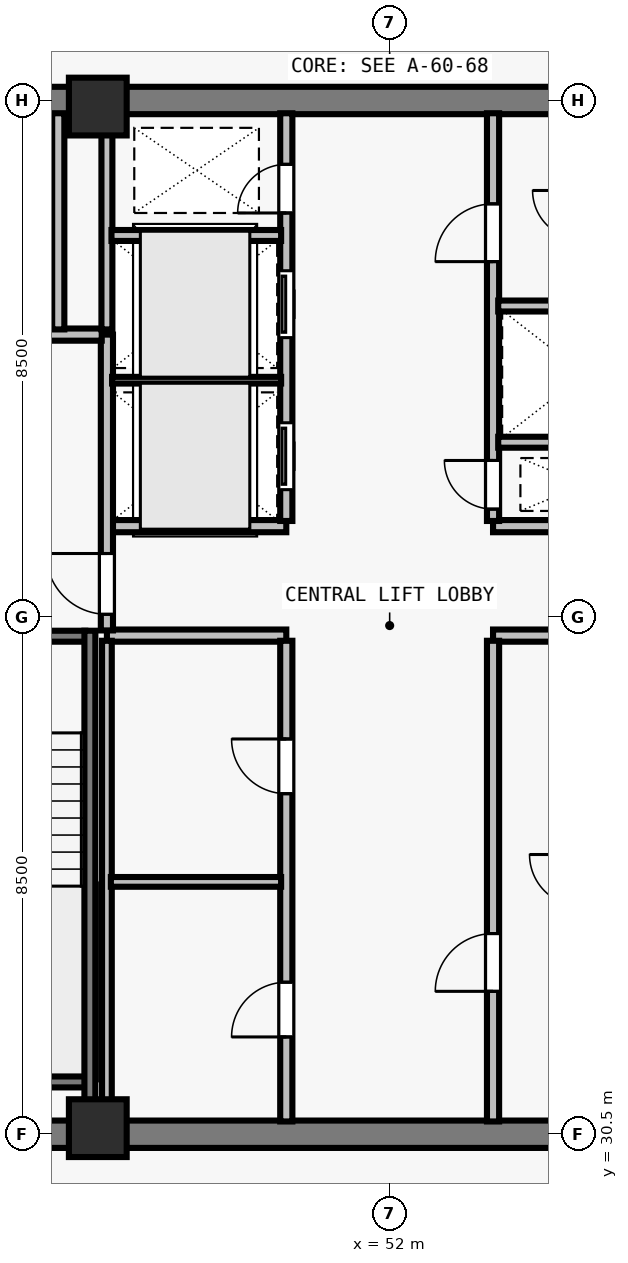
"""IFC4 building model, lengths in metres.
Left out: names, types, materials, properties, quantities, classifications, styles, units other than length and angle.
Written with IfcOpenShell. Run it as: python <this file> out.ifc"""

import sys

from ifc_helpers import new_model, si_unit, direction, frame, frame_2d, origin, origin_2d, place, context, subcontext, project, spatial, rectangle, extrude, element, fill, save


model = new_model("IFC4")
c1 = context("Model", 3, precision=1e-05, world=origin(), true_north=direction((0.0, 1.0)))
c2 = subcontext(c1, "Body", "Model", "MODEL_VIEW")
j1 = project(units=[si_unit("LENGTHUNIT", "METRE"), si_unit("PLANEANGLEUNIT", "RADIAN")], contexts=[c1])
p1 = place(None, origin())
s1 = spatial("IfcSite", under=j1, at=p1, CompositionType="ELEMENT")
p2 = place(p1, origin())
s2 = spatial("IfcBuilding", under=s1, at=p2, CompositionType="ELEMENT")
p3 = place(p2, frame((0.0, 0.0, 237.5)))
s3 = spatial("IfcBuildingStorey", under=s2, at=p3, CompositionType="ELEMENT", Elevation=237.5)
for number, where, z_axis, x_axis in (
    (1, (47.2, 30.6, 0.0), (0.0, 0.0, 1.0), (1.0, 0.0, 0.0)),
    (2, (47.2, 47.4, 0.0), (0.0, 0.0, 1.0), (1.0, 0.0, 0.0)),
):
    element("IfcColumn", number, at=place(p3, frame(where, z_axis=z_axis, x_axis=x_axis)), inside=s3, PredefinedType="COLUMN", context=c2, shape_type="SweptSolid", body=[
        extrude(rectangle(XDim=0.95, YDim=0.95, at=origin_2d()), origin(), (0.0, 0.0, 1.0), 3.5),
    ])
for number, where, z_axis, x_axis in (
    (3, (43.275, 30.5, 0.0), (0.0, 0.0, 1.0), (1.0, 0.0, 0.0)),
    (4, (43.275, 47.5, 0.0), (0.0, 0.0, 1.0), (1.0, 0.0, 0.0)),
):
    element("IfcWall", number, at=place(p3, frame(where, z_axis=z_axis, x_axis=x_axis)), inside=s3, PredefinedType="SHEAR", context=c2, shape_type="SweptSolid", body=[
        extrude(rectangle(XDim=17.45, YDim=0.45, at=frame_2d((8.725, 0.0))), origin(), (0.0, 0.0, 1.0), 3.29),
    ])
for number, where, z_axis, x_axis in (
    (5, (47.35, 38.7, 0.0), (0.0, 0.0, 1.0), (1.0, 0.0, 0.0)),
    (6, (47.35, 40.5, 0.0), (0.0, 0.0, 1.0), (1.0, 0.0, 0.0)),
    (7, (53.7, 38.7, 0.0), (0.0, 0.0, 1.0), (1.0, 0.0, 0.0)),
    (8, (53.7, 40.5, 0.0), (0.0, 0.0, 1.0), (1.0, 0.0, 0.0)),
):
    element("IfcWall", number, at=place(p3, frame(where, z_axis=z_axis, x_axis=x_axis)), inside=s3, PredefinedType="SOLIDWALL", context=c2, shape_type="SweptSolid", body=[
        extrude(rectangle(XDim=2.95, YDim=0.2, at=frame_2d((1.475, 0.0))), origin(), (0.0, 0.0, 1.0), 3.29),
    ])
p4 = place(p3, frame((50.3, 30.71, 0.0), z_axis=(0.0, 0.0, 1.0), x_axis=(0.0, 1.0, 0.0)))
e9 = element("IfcWall", 9, at=p4, inside=s3, PredefinedType="SOLIDWALL", context=c2, shape_type="SweptSolid", body=[
    extrude(rectangle(XDim=7.905, YDim=0.2, at=frame_2d((3.953, 0.0))), origin(), (0.0, 0.0, 1.0), 3.29),
])
p5 = place(p4, frame((1.39, 0.0, 0.0)))
e10 = element("IfcOpeningElement", 10, at=p5, cuts=e9, PredefinedType="OPENING", context=c2, shape_type="SweptSolid", body=[
    extrude(rectangle(XDim=0.9, YDim=2.12, at=frame_2d((0.45, 1.06))), frame((0.0, 0.11, 0.0), z_axis=(0.0, -1.0, 0.0), x_axis=(1.0, 0.0, 0.0)), (0.0, 0.0, 1.0), 0.22),
])
p6 = place(p4, frame((5.39, 0.0, 0.0)))
e11 = element("IfcOpeningElement", 11, at=p6, cuts=e9, PredefinedType="OPENING", context=c2, shape_type="SweptSolid", body=[
    extrude(rectangle(XDim=0.9, YDim=2.12, at=frame_2d((0.45, 1.06))), frame((0.0, 0.11, 0.0), z_axis=(0.0, -1.0, 0.0), x_axis=(1.0, 0.0, 0.0)), (0.0, 0.0, 1.0), 0.22),
])
p7 = place(p3, frame((53.7, 30.71, 0.0), z_axis=(0.0, 0.0, 1.0), x_axis=(0.0, 1.0, 0.0)))
e12 = element("IfcWall", 12, at=p7, inside=s3, PredefinedType="SOLIDWALL", context=c2, shape_type="SweptSolid", body=[
    extrude(rectangle(XDim=7.905, YDim=0.2, at=frame_2d((3.953, 0.0))), origin(), (0.0, 0.0, 1.0), 3.29),
])
p8 = place(p7, frame((2.14, 0.0, 0.0)))
e13 = element("IfcOpeningElement", 13, at=p8, cuts=e12, PredefinedType="OPENING", context=c2, shape_type="SweptSolid", body=[
    extrude(rectangle(XDim=0.95, YDim=2.12, at=frame_2d((0.475, 1.06))), frame((0.0, 0.11, 0.0), z_axis=(0.0, -1.0, 0.0), x_axis=(1.0, 0.0, 0.0)), (0.0, 0.0, 1.0), 0.22),
])
p9 = place(p3, frame((50.3, 40.585, 0.0), z_axis=(0.0, 0.0, 1.0), x_axis=(0.0, 1.0, 0.0)))
e14 = element("IfcWall", 14, at=p9, inside=s3, PredefinedType="SOLIDWALL", context=c2, shape_type="SweptSolid", body=[
    extrude(rectangle(XDim=6.705, YDim=0.2, at=frame_2d((3.353, 0.0))), origin(), (0.0, 0.0, 1.0), 3.29),
])
p10 = place(p9, frame((0.515, 0.0, 0.0)))
e15 = element("IfcOpeningElement", 15, at=p10, cuts=e14, PredefinedType="OPENING", context=c2, shape_type="SweptSolid", body=[
    extrude(rectangle(XDim=1.1, YDim=2.2, at=frame_2d((0.55, 1.1))), frame((0.0, 0.11, 0.0), z_axis=(0.0, -1.0, 0.0), x_axis=(1.0, 0.0, 0.0)), (0.0, 0.0, 1.0), 0.22),
])
p11 = place(p9, frame((3.015, 0.0, 0.0)))
e16 = element("IfcOpeningElement", 16, at=p11, cuts=e14, PredefinedType="OPENING", context=c2, shape_type="SweptSolid", body=[
    extrude(rectangle(XDim=1.1, YDim=2.2, at=frame_2d((0.55, 1.1))), frame((0.0, 0.11, 0.0), z_axis=(0.0, -1.0, 0.0), x_axis=(1.0, 0.0, 0.0)), (0.0, 0.0, 1.0), 0.22),
])
p12 = place(p9, frame((5.065, 0.0, 0.0)))
e17 = element("IfcOpeningElement", 17, at=p12, cuts=e14, PredefinedType="OPENING", context=c2, shape_type="SweptSolid", body=[
    extrude(rectangle(XDim=0.8, YDim=2.08, at=frame_2d((0.4, 1.04))), frame((0.0, 0.11, 0.0), z_axis=(0.0, -1.0, 0.0), x_axis=(1.0, 0.0, 0.0)), (0.0, 0.0, 1.0), 0.22),
])
p13 = place(p3, frame((53.7, 40.585, 0.0), z_axis=(0.0, 0.0, 1.0), x_axis=(0.0, 1.0, 0.0)))
e18 = element("IfcWall", 18, at=p13, inside=s3, PredefinedType="SOLIDWALL", context=c2, shape_type="SweptSolid", body=[
    extrude(rectangle(XDim=6.705, YDim=0.2, at=frame_2d((3.353, 0.0))), origin(), (0.0, 0.0, 1.0), 3.29),
])
p14 = place(p13, frame((0.195, 0.0, 0.0)))
e19 = element("IfcOpeningElement", 19, at=p14, cuts=e18, PredefinedType="OPENING", context=c2, shape_type="SweptSolid", body=[
    extrude(rectangle(XDim=0.8, YDim=2.08, at=frame_2d((0.4, 1.04))), frame((0.0, 0.11, 0.0), z_axis=(0.0, -1.0, 0.0), x_axis=(1.0, 0.0, 0.0)), (0.0, 0.0, 1.0), 0.22),
])
p15 = place(p13, frame((4.265, 0.0, 0.0)))
e20 = element("IfcOpeningElement", 20, at=p15, cuts=e18, PredefinedType="OPENING", context=c2, shape_type="SweptSolid", body=[
    extrude(rectangle(XDim=0.95, YDim=2.12, at=frame_2d((0.475, 1.06))), frame((0.0, 0.11, 0.0), z_axis=(0.0, -1.0, 0.0), x_axis=(1.0, 0.0, 0.0)), (0.0, 0.0, 1.0), 0.22),
])
p16 = place(p3, frame((47.35, 38.785, 0.0), z_axis=(0.0, 0.0, 1.0), x_axis=(0.0, 1.0, 0.0)))
e21 = element("IfcWall", 21, at=p16, inside=s3, PredefinedType="SOLIDWALL", context=c2, shape_type="SweptSolid", body=[
    extrude(rectangle(XDim=4.865, YDim=0.2, at=frame_2d((2.433, 0.0))), origin(), (0.0, 0.0, 1.0), 3.29),
])
p17 = place(p16, frame((0.265, 0.0, 0.0)))
e22 = element("IfcOpeningElement", 22, at=p17, cuts=e21, PredefinedType="OPENING", context=c2, shape_type="SweptSolid", body=[
    extrude(rectangle(XDim=1.0, YDim=2.15, at=frame_2d((0.5, 1.075))), frame((0.0, 0.11, 0.0), z_axis=(0.0, -1.0, 0.0), x_axis=(1.0, 0.0, 0.0)), (0.0, 0.0, 1.0), 0.22),
])
p18 = place(p3, frame((43.71, 43.65, 0.0), z_axis=(0.0, 0.0, 1.0), x_axis=(1.0, 0.0, 0.0)))
e23 = element("IfcWall", 23, at=p18, inside=s3, PredefinedType="SOLIDWALL", context=c2, shape_type="SweptSolid", body=[
    extrude(rectangle(XDim=3.555, YDim=0.2, at=frame_2d((1.777, 0.0))), origin(), (0.0, 0.0, 1.0), 3.29),
])
p19 = place(p18, frame((1.16, 0.0, 0.0)))
e24 = element("IfcOpeningElement", 24, at=p19, cuts=e23, PredefinedType="OPENING", context=c2, shape_type="SweptSolid", body=[
    extrude(rectangle(XDim=1.1, YDim=2.2, at=frame_2d((0.55, 1.1))), frame((0.0, 0.11, 0.0), z_axis=(0.0, -1.0, 0.0), x_axis=(1.0, 0.0, 0.0)), (0.0, 0.0, 1.0), 0.22),
])
p20 = place(p3, frame((46.55, 43.735, 0.0), z_axis=(0.0, 0.0, 1.0), x_axis=(0.0, 1.0, 0.0)))
e25 = element("IfcWall", 25, at=p20, inside=s3, PredefinedType="SOLIDWALL", context=c2, shape_type="SweptSolid", body=[
    extrude(rectangle(XDim=3.555, YDim=0.2, at=frame_2d((1.777, 0.0))), origin(), (0.0, 0.0, 1.0), 3.29),
])
p21 = place(p3, frame((47.35, 30.71, 0.0), z_axis=(0.0, 0.0, 1.0), x_axis=(0.0, 1.0, 0.0)))
e26 = element("IfcWall", 26, at=p21, inside=s3, PredefinedType="PARTITIONING", context=c2, shape_type="SweptSolid", body=[
    extrude(rectangle(XDim=7.905, YDim=0.16, at=frame_2d((3.953, 0.0))), origin(), (0.0, 0.0, 1.0), 3.29),
])
p22 = place(p3, frame((47.415, 34.65, 0.0), z_axis=(0.0, 0.0, 1.0), x_axis=(1.0, 0.0, 0.0)))
e27 = element("IfcWall", 27, at=p22, inside=s3, PredefinedType="PARTITIONING", context=c2, shape_type="SweptSolid", body=[
    extrude(rectangle(XDim=2.8, YDim=0.16, at=frame_2d((1.4, 0.0))), origin(), (0.0, 0.0, 1.0), 3.29),
])
p23 = place(p3, frame((47.35, 43.735, 0.0), z_axis=(0.0, 0.0, 1.0), x_axis=(0.0, 1.0, 0.0)))
e28 = element("IfcWall", 28, at=p23, inside=s3, PredefinedType="SOLIDWALL", context=c2, shape_type="SweptSolid", body=[
    extrude(rectangle(XDim=3.555, YDim=0.18, at=frame_2d((1.777, 0.0))), origin(), (0.0, 0.0, 1.0), 3.29),
])
p24 = place(p3, frame((47.435, 42.9, 0.0), z_axis=(0.0, 0.0, 1.0), x_axis=(1.0, 0.0, 0.0)))
e29 = element("IfcWall", 29, at=p24, inside=s3, PredefinedType="PARTITIONING", context=c2, shape_type="SweptSolid", body=[
    extrude(rectangle(XDim=2.78, YDim=0.11, at=frame_2d((1.39, 0.0))), origin(), (0.0, 0.0, 1.0), 3.29),
])
p25 = place(p3, frame((47.425, 45.28, 0.0), z_axis=(0.0, 0.0, 1.0), x_axis=(1.0, 0.0, 0.0)))
e30 = element("IfcWall", 30, at=p25, inside=s3, PredefinedType="SOLIDWALL", context=c2, shape_type="SweptSolid", body=[
    extrude(rectangle(XDim=2.79, YDim=0.18, at=frame_2d((1.395, 0.0))), origin(), (0.0, 0.0, 1.0), 3.29),
])
p26 = place(p3, frame((53.785, 41.88, 0.0), z_axis=(0.0, 0.0, 1.0), x_axis=(1.0, 0.0, 0.0)))
e31 = element("IfcWall", 31, at=p26, inside=s3, PredefinedType="SOLIDWALL", context=c2, shape_type="SweptSolid", body=[
    extrude(rectangle(XDim=2.78, YDim=0.18, at=frame_2d((1.39, 0.0))), origin(), (0.0, 0.0, 1.0), 3.29),
])
p27 = place(p3, frame((53.785, 44.12, 0.0), z_axis=(0.0, 0.0, 1.0), x_axis=(1.0, 0.0, 0.0)))
e32 = element("IfcWall", 32, at=p27, inside=s3, PredefinedType="SOLIDWALL", context=c2, shape_type="SweptSolid", body=[
    extrude(rectangle(XDim=2.79, YDim=0.18, at=frame_2d((1.395, 0.0))), origin(), (0.0, 0.0, 1.0), 3.29),
])
p28 = place(p3, frame((43.715, 38.69, 0.0), z_axis=(0.0, 0.0, 1.0), x_axis=(1.0, 0.0, 0.0)))
e33 = element("IfcWall", 33, at=p28, inside=s3, PredefinedType="SOLIDWALL", context=c2, shape_type="SweptSolid", body=[
    extrude(rectangle(XDim=3.28, YDim=0.18, at=frame_2d((1.64, 0.0))), origin(), (0.0, 0.0, 1.0), 3.29),
])
p29 = place(p28, frame((1.165, 0.0, 0.0)))
e34 = element("IfcOpeningElement", 34, at=p29, cuts=e33, PredefinedType="OPENING", context=c2, shape_type="SweptSolid", body=[
    extrude(rectangle(XDim=0.95, YDim=2.15, at=frame_2d((0.475, 1.075))), frame((0.0, 0.1, 0.0), z_axis=(0.0, -1.0, 0.0), x_axis=(1.0, 0.0, 0.0)), (0.0, 0.0, 1.0), 0.2),
])
p30 = place(p3, frame((43.715, 31.36, 0.0), z_axis=(0.0, 0.0, 1.0), x_axis=(1.0, 0.0, 0.0)))
e35 = element("IfcWall", 35, at=p30, inside=s3, PredefinedType="SOLIDWALL", context=c2, shape_type="SweptSolid", body=[
    extrude(rectangle(XDim=3.28, YDim=0.18, at=frame_2d((1.64, 0.0))), origin(), (0.0, 0.0, 1.0), 3.29),
])
p31 = place(p3, frame((47.07, 38.78, 0.0), z_axis=(0.0, 0.0, 1.0), x_axis=(0.0, -1.0, 0.0)))
e36 = element("IfcWall", 36, at=p31, inside=s3, PredefinedType="SOLIDWALL", context=c2, shape_type="SweptSolid", body=[
    extrude(rectangle(XDim=8.067, YDim=0.18, at=frame_2d((4.034, 0.0))), origin(), (0.0, 0.0, 1.0), 3.29),
])
p32 = place(p17, origin())
e37 = element("IfcDoor", 37, at=p32, inside=s3, OperationType="SINGLE_SWING_RIGHT", PredefinedType="DOOR", context=c2, shape_type="SweptSolid", body=[
    extrude(rectangle(XDim=1.0, YDim=2.15, at=frame_2d((0.5, 1.075))), frame((0.0, 0.025, 0.0), z_axis=(0.0, -1.0, 0.0), x_axis=(1.0, 0.0, 0.0)), (0.0, 0.0, 1.0), 0.05),
])
fill(e22, e37)
p33 = place(p5, origin())
e38 = element("IfcDoor", 38, at=p33, inside=s3, OperationType="SINGLE_SWING_LEFT", PredefinedType="DOOR", context=c2, shape_type="SweptSolid", body=[
    extrude(rectangle(XDim=0.9, YDim=2.12, at=frame_2d((0.45, 1.06))), frame((0.0, 0.025, 0.0), z_axis=(0.0, -1.0, 0.0), x_axis=(1.0, 0.0, 0.0)), (0.0, 0.0, 1.0), 0.05),
])
fill(e10, e38)
p34 = place(p6, origin())
e39 = element("IfcDoor", 39, at=p34, inside=s3, OperationType="SINGLE_SWING_RIGHT", PredefinedType="DOOR", context=c2, shape_type="SweptSolid", body=[
    extrude(rectangle(XDim=0.9, YDim=2.12, at=frame_2d((0.45, 1.06))), frame((0.0, 0.025, 0.0), z_axis=(0.0, -1.0, 0.0), x_axis=(1.0, 0.0, 0.0)), (0.0, 0.0, 1.0), 0.05),
])
fill(e11, e39)
p35 = place(p8, origin())
e40 = element("IfcDoor", 40, at=p35, inside=s3, OperationType="SINGLE_SWING_LEFT", PredefinedType="DOOR", context=c2, shape_type="SweptSolid", body=[
    extrude(rectangle(XDim=0.95, YDim=2.12, at=frame_2d((0.475, 1.06))), frame((0.0, 0.025, 0.0), z_axis=(0.0, -1.0, 0.0), x_axis=(1.0, 0.0, 0.0)), (0.0, 0.0, 1.0), 0.05),
])
fill(e13, e40)
p36 = place(p10, origin())
e41 = element("IfcDoor", 41, at=p36, inside=s3, OperationType="SLIDING_TO_LEFT", PredefinedType="DOOR", context=c2, shape_type="SweptSolid", body=[
    extrude(rectangle(XDim=1.1, YDim=2.2, at=frame_2d((0.55, 1.1))), frame((0.0, 0.025, 0.0), z_axis=(0.0, -1.0, 0.0), x_axis=(1.0, 0.0, 0.0)), (0.0, 0.0, 1.0), 0.05),
])
fill(e15, e41)
p37 = place(p11, origin())
e42 = element("IfcDoor", 42, at=p37, inside=s3, OperationType="SLIDING_TO_LEFT", PredefinedType="DOOR", context=c2, shape_type="SweptSolid", body=[
    extrude(rectangle(XDim=1.1, YDim=2.2, at=frame_2d((0.55, 1.1))), frame((0.0, 0.025, 0.0), z_axis=(0.0, -1.0, 0.0), x_axis=(1.0, 0.0, 0.0)), (0.0, 0.0, 1.0), 0.05),
])
fill(e16, e42)
p38 = place(p12, origin())
e43 = element("IfcDoor", 43, at=p38, inside=s3, OperationType="SINGLE_SWING_LEFT", PredefinedType="DOOR", context=c2, shape_type="SweptSolid", body=[
    extrude(rectangle(XDim=0.8, YDim=2.08, at=frame_2d((0.4, 1.04))), frame((0.0, 0.025, 0.0), z_axis=(0.0, -1.0, 0.0), x_axis=(1.0, 0.0, 0.0)), (0.0, 0.0, 1.0), 0.05),
])
fill(e17, e43)
p39 = place(p14, origin())
e44 = element("IfcDoor", 44, at=p39, inside=s3, OperationType="SINGLE_SWING_RIGHT", PredefinedType="DOOR", context=c2, shape_type="SweptSolid", body=[
    extrude(rectangle(XDim=0.8, YDim=2.08, at=frame_2d((0.4, 1.04))), frame((0.0, 0.025, 0.0), z_axis=(0.0, -1.0, 0.0), x_axis=(1.0, 0.0, 0.0)), (0.0, 0.0, 1.0), 0.05),
])
fill(e19, e44)
p40 = place(p15, origin())
e45 = element("IfcDoor", 45, at=p40, inside=s3, OperationType="SINGLE_SWING_LEFT", PredefinedType="DOOR", context=c2, shape_type="SweptSolid", body=[
    extrude(rectangle(XDim=0.95, YDim=2.12, at=frame_2d((0.475, 1.06))), frame((0.0, 0.025, 0.0), z_axis=(0.0, -1.0, 0.0), x_axis=(1.0, 0.0, 0.0)), (0.0, 0.0, 1.0), 0.05),
])
fill(e20, e45)
save(model, sys.argv[1])
